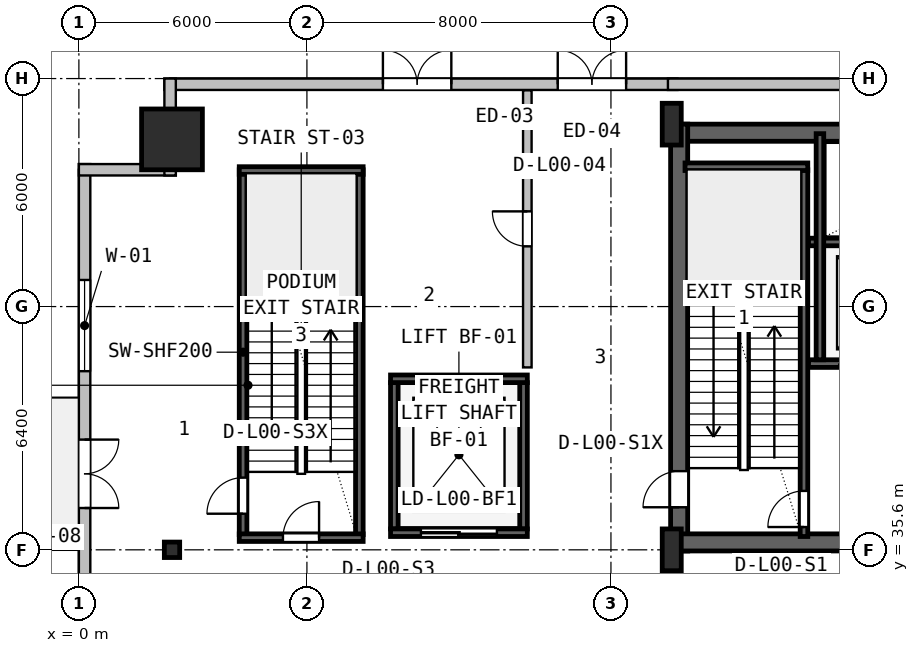
"""IFC4 building model, lengths in metres.
Left out: names, types, materials, properties, quantities, classifications, styles, units other than length and angle.
Written with IfcOpenShell. Run it as: python <this file> out.ifc"""

import sys

from ifc_helpers import new_model, si_unit, direction, frame, frame_2d, origin, origin_2d, place, context, subcontext, project, spatial, rectangle, hollow_rectangle, i_section, extrude, source, transform, mapped, element, fill, save


model = new_model("IFC4")
c1 = context("Model", 3, precision=1e-05, world=origin(), true_north=direction((0.0, 1.0)))
c2 = subcontext(c1, "Body", "Model", "MODEL_VIEW")
j1 = project(units=[si_unit("LENGTHUNIT", "METRE"), si_unit("PLANEANGLEUNIT", "RADIAN")], contexts=[c1])
p1 = place(None, origin())
s1 = spatial("IfcSite", under=j1, at=p1, CompositionType="ELEMENT")
p2 = place(p1, origin())
s2 = spatial("IfcBuilding", under=s1, at=p2, CompositionType="ELEMENT")
p3 = place(p2, origin())
s3 = spatial("IfcBuildingStorey", under=s2, at=p3, CompositionType="ELEMENT", Elevation=0.0)
p4 = place(p3, frame((15.6, 46.575, 0.0), z_axis=(0.0, 0.0, 1.0), x_axis=(1.0, 0.0, 0.0)))
e1 = element("IfcWall", 1, at=p4, inside=s3, PredefinedType="SHEAR", context=c2, shape_type="SweptSolid", body=[
    extrude(rectangle(XDim=36.8, YDim=0.45, at=frame_2d((18.4, 0.0))), origin(), (0.0, 0.0, 1.0), 5.72),
])
p5 = place(p3, frame((15.795, 35.57, 0.0), z_axis=(0.0, 0.0, 1.0), x_axis=(0.0, 1.0, 0.0)))
e2 = element("IfcWall", 2, at=p5, inside=s3, PredefinedType="SHEAR", context=c2, shape_type="SweptSolid", body=[
    extrude(rectangle(XDim=11.23, YDim=0.45, at=frame_2d((5.615, 0.0))), origin(), (0.0, 0.0, 1.0), 5.72),
])
p6 = place(p5, frame((1.15, 0.0, 0.0)))
e3 = element("IfcOpeningElement", 3, at=p6, cuts=e2, PredefinedType="OPENING", context=c2, shape_type="SweptSolid", body=[
    extrude(rectangle(XDim=0.95, YDim=2.1, at=frame_2d((0.475, 1.05))), frame((0.0, 0.235, 0.0), z_axis=(0.0, -1.0, 0.0), x_axis=(1.0, 0.0, 0.0)), (0.0, 0.0, 1.0), 0.47),
])
p7 = place(p3, frame((15.57, 35.795, 0.0), z_axis=(0.0, 0.0, 1.0), x_axis=(1.0, 0.0, 0.0)))
e4 = element("IfcWall", 4, at=p7, inside=s3, PredefinedType="SHEAR", context=c2, shape_type="SweptSolid", body=[
    extrude(rectangle(XDim=9.23, YDim=0.45, at=frame_2d((4.615, 0.0))), origin(), (0.0, 0.0, 1.0), 5.72),
])
p8 = place(p7, frame((5.4, 0.0, 0.0)))
e5 = element("IfcOpeningElement", 5, at=p8, cuts=e4, PredefinedType="OPENING", context=c2, shape_type="SweptSolid", body=[
    extrude(rectangle(XDim=1.0, YDim=2.1, at=frame_2d((0.5, 1.05))), frame((0.0, 0.235, 0.0), z_axis=(0.0, -1.0, 0.0), x_axis=(1.0, 0.0, 0.0)), (0.0, 0.0, 1.0), 0.47),
])
m1 = source(origin(), c2, "Body", "SweptSolid", [
    extrude(i_section(OverallWidth=0.5, OverallDepth=1.1, WebThickness=0.018, FlangeThickness=0.032, FilletRadius=0.018, at=origin_2d()), origin(), (0.0, 0.0, 1.0), 6.0),
])
for number, where, z_axis, x_axis in (
    (6, (15.6, 35.6, 0.0), (0.0, 0.0, 1.0), (1.0, 0.0, 0.0)),
    (7, (15.6, 46.8, 0.0), (0.0, 0.0, 1.0), (1.0, 0.0, 0.0)),
):
    element("IfcColumn", number, at=place(p3, frame(where, z_axis=z_axis, x_axis=x_axis)), inside=s3, PredefinedType="COLUMN", context=c2, shape_type="MappedRepresentation", body=[
        mapped(m1, transform((0.0, 0.0, 0.0), x_axis=(1.0, 0.0, 0.0), y_axis=(0.0, 1.0, 0.0), z_axis=(0.0, 0.0, 1.0), scale=1.0)),
    ])
m2 = source(origin(), c2, "Body", "SweptSolid", [
    extrude(hollow_rectangle(XDim=1.6, YDim=1.6, WallThickness=0.06, at=origin_2d()), origin(), (0.0, 0.0, 1.0), 6.0),
])
p9 = place(p3, frame((2.45, 46.4, 0.0), z_axis=(0.0, 0.0, 1.0), x_axis=(1.0, 0.0, 0.0)))
e8 = element("IfcColumn", 8, at=p9, inside=s3, PredefinedType="COLUMN", context=c2, shape_type="MappedRepresentation", body=[
    mapped(m2, transform((0.0, 0.0, 0.0), x_axis=(1.0, 0.0, 0.0), y_axis=(0.0, 1.0, 0.0), z_axis=(0.0, 0.0, 1.0), scale=1.0)),
])
m3 = source(origin(), c2, "Body", "SweptSolid", [
    extrude(i_section(OverallWidth=0.404, OverallDepth=0.407, WebThickness=0.027, FlangeThickness=0.044, FilletRadius=0.018, at=origin_2d()), origin(), (0.0, 0.0, 1.0), 6.0),
])
p10 = place(p3, frame((2.45, 35.6, 0.0), z_axis=(0.0, 0.0, 1.0), x_axis=(1.0, 0.0, 0.0)))
e9 = element("IfcColumn", 9, at=p10, inside=s3, PredefinedType="COLUMN", context=c2, shape_type="MappedRepresentation", body=[
    mapped(m3, transform((0.0, 0.0, 0.0), x_axis=(1.0, 0.0, 0.0), y_axis=(0.0, 1.0, 0.0), z_axis=(0.0, 0.0, 1.0), scale=1.0)),
])
p11 = place(p3, frame((2.25, 47.85, 0.0), z_axis=(0.0, 0.0, 1.0), x_axis=(1.0, 0.0, 0.0)))
e10 = element("IfcWall", 10, at=p11, inside=s3, PredefinedType="SOLIDWALL", context=c2, shape_type="SweptSolid", body=[
    extrude(rectangle(XDim=13.5, YDim=0.3, at=frame_2d((6.75, 0.0))), origin(), (0.0, 0.0, 1.0), 5.7),
])
p12 = place(p11, frame((5.75, 0.0, 0.0)))
e11 = element("IfcOpeningElement", 11, at=p12, cuts=e10, PredefinedType="OPENING", context=c2, shape_type="SweptSolid", body=[
    extrude(rectangle(XDim=1.8, YDim=2.15, at=frame_2d((0.9, 1.075))), frame((0.0, 0.16, 0.0), z_axis=(0.0, -1.0, 0.0), x_axis=(1.0, 0.0, 0.0)), (0.0, 0.0, 1.0), 0.32),
])
p13 = place(p11, frame((10.35, 0.0, 0.0)))
e12 = element("IfcOpeningElement", 12, at=p13, cuts=e10, PredefinedType="OPENING", context=c2, shape_type="SweptSolid", body=[
    extrude(rectangle(XDim=1.8, YDim=2.15, at=frame_2d((0.9, 1.075))), frame((0.0, 0.16, 0.0), z_axis=(0.0, -1.0, 0.0), x_axis=(1.0, 0.0, 0.0)), (0.0, 0.0, 1.0), 0.32),
])
p14 = place(p3, frame((15.5, 47.85, 0.0), z_axis=(0.0, 0.0, 1.0), x_axis=(1.0, 0.0, 0.0)))
e13 = element("IfcWall", 13, at=p14, inside=s3, PredefinedType="SOLIDWALL", context=c2, shape_type="SweptSolid", body=[
    extrude(rectangle(XDim=37.0, YDim=0.3, at=frame_2d((18.5, 0.0))), origin(), (0.0, 0.0, 1.0), 5.7),
])
p15 = place(p3, frame((0.15, 26.5, 0.0), z_axis=(0.0, 0.0, 1.0), x_axis=(0.0, 1.0, 0.0)))
e14 = element("IfcWall", 14, at=p15, inside=s3, PredefinedType="SOLIDWALL", context=c2, shape_type="SweptSolid", body=[
    extrude(rectangle(XDim=19.25, YDim=0.3, at=frame_2d((9.625, 0.0))), origin(), (0.0, 0.0, 1.0), 5.7),
])
p16 = place(p15, frame((10.2, 0.0, 0.0)))
e15 = element("IfcOpeningElement", 15, at=p16, cuts=e14, PredefinedType="OPENING", context=c2, shape_type="SweptSolid", body=[
    extrude(rectangle(XDim=1.8, YDim=2.15, at=frame_2d((0.9, 1.075))), frame((0.0, 0.16, 0.0), z_axis=(0.0, -1.0, 0.0), x_axis=(1.0, 0.0, 0.0)), (0.0, 0.0, 1.0), 0.32),
])
p17 = place(p15, frame((13.8, 0.0, 0.9)))
e16 = element("IfcOpeningElement", 16, at=p17, cuts=e14, PredefinedType="OPENING", context=c2, shape_type="SweptSolid", body=[
    extrude(rectangle(XDim=2.4, YDim=2.4, at=frame_2d((1.2, 1.2))), frame((0.0, 0.16, 0.0), z_axis=(0.0, -1.0, 0.0), x_axis=(1.0, 0.0, 0.0)), (0.0, 0.0, 1.0), 0.32),
])
for number, where, z_axis, x_axis in (
    (17, (0.0, 45.6, 0.0), (0.0, 0.0, 1.0), (1.0, 0.0, 0.0)),
    (18, (2.4, 45.45, 0.0), (0.0, 0.0, 1.0), (0.0, 1.0, 0.0)),
):
    element("IfcWall", number, at=place(p3, frame(where, z_axis=z_axis, x_axis=x_axis)), inside=s3, PredefinedType="SOLIDWALL", context=c2, shape_type="SweptSolid", body=[
        extrude(rectangle(XDim=2.55, YDim=0.3, at=frame_2d((1.275, 0.0))), origin(), (0.0, 0.0, 1.0), 4.783),
    ])
p18 = place(p3, frame((19.08, 35.95, 0.0), z_axis=(0.0, 0.0, 1.0), x_axis=(0.0, 1.0, 0.0)))
e19 = element("IfcWall", 19, at=p18, inside=s3, PredefinedType="SHEAR", context=c2, shape_type="SweptSolid", body=[
    extrude(rectangle(XDim=9.65, YDim=0.2, at=frame_2d((4.825, 0.0))), origin(), (0.0, 0.0, 1.0), 5.72),
])
p19 = place(p18, frame((0.25, 0.0, 0.0)))
e20 = element("IfcOpeningElement", 20, at=p19, cuts=e19, PredefinedType="OPENING", context=c2, shape_type="SweptSolid", body=[
    extrude(rectangle(XDim=0.95, YDim=2.1, at=frame_2d((0.475, 1.05))), frame((0.0, 0.11, 0.0), z_axis=(0.0, -1.0, 0.0), x_axis=(1.0, 0.0, 0.0)), (0.0, 0.0, 1.0), 0.22),
])
p20 = place(p3, frame((15.95, 45.68, 0.0), z_axis=(0.0, 0.0, 1.0), x_axis=(1.0, 0.0, 0.0)))
e21 = element("IfcWall", 21, at=p20, inside=s3, PredefinedType="SHEAR", context=c2, shape_type="SweptSolid", body=[
    extrude(rectangle(XDim=3.23, YDim=0.2, at=frame_2d((1.615, 0.0))), origin(), (0.0, 0.0, 1.0), 5.72),
])
p21 = place(p3, frame((19.2, 40.5, 0.0), z_axis=(0.0, 0.0, 1.0), x_axis=(1.0, 0.0, 0.0)))
e22 = element("IfcWall", 22, at=p21, inside=s3, PredefinedType="SHEAR", context=c2, shape_type="SweptSolid", body=[
    extrude(rectangle(XDim=5.52, YDim=0.2, at=frame_2d((2.76, 0.0))), origin(), (0.0, 0.0, 1.0), 5.72),
])
p22 = place(p21, frame((1.05, 0.0, 0.0)))
e23 = element("IfcOpeningElement", 23, at=p22, cuts=e22, PredefinedType="OPENING", context=c2, shape_type="SweptSolid", body=[
    extrude(rectangle(XDim=1.1, YDim=2.18, at=frame_2d((0.55, 1.09))), frame((0.0, 0.11, 0.0), z_axis=(0.0, -1.0, 0.0), x_axis=(1.0, 0.0, 0.0)), (0.0, 0.0, 1.0), 0.22),
])
p23 = place(p21, frame((3.65, 0.0, 0.0)))
e24 = element("IfcOpeningElement", 24, at=p23, cuts=e22, PredefinedType="OPENING", context=c2, shape_type="SweptSolid", body=[
    extrude(rectangle(XDim=1.1, YDim=2.18, at=frame_2d((0.55, 1.09))), frame((0.0, 0.11, 0.0), z_axis=(0.0, -1.0, 0.0), x_axis=(1.0, 0.0, 0.0)), (0.0, 0.0, 1.0), 0.22),
])
p24 = place(p3, frame((19.2, 43.7, 0.0), z_axis=(0.0, 0.0, 1.0), x_axis=(1.0, 0.0, 0.0)))
e25 = element("IfcWall", 25, at=p24, inside=s3, PredefinedType="SHEAR", context=c2, shape_type="SweptSolid", body=[
    extrude(rectangle(XDim=5.52, YDim=0.2, at=frame_2d((2.76, 0.0))), origin(), (0.0, 0.0, 1.0), 5.72),
])
p25 = place(p3, frame((19.5, 40.6, 0.0), z_axis=(0.0, 0.0, 1.0), x_axis=(0.0, 1.0, 0.0)))
e26 = element("IfcWall", 26, at=p25, inside=s3, PredefinedType="SHEAR", context=c2, shape_type="SweptSolid", body=[
    extrude(rectangle(XDim=5.95, YDim=0.2, at=frame_2d((2.975, 0.0))), origin(), (0.0, 0.0, 1.0), 5.72),
])
p26 = place(p3, frame((4.32, 36.0, 0.0), z_axis=(0.0, 0.0, 1.0), x_axis=(0.0, 1.0, 0.0)))
e27 = element("IfcWall", 27, at=p26, inside=s3, PredefinedType="SHEAR", context=c2, shape_type="SweptSolid", body=[
    extrude(rectangle(XDim=9.6, YDim=0.2, at=frame_2d((4.8, 0.0))), origin(), (0.0, 0.0, 1.0), 5.72),
])
p27 = place(p26, frame((0.55, 0.0, 0.0)))
e28 = element("IfcOpeningElement", 28, at=p27, cuts=e27, PredefinedType="OPENING", context=c2, shape_type="SweptSolid", body=[
    extrude(rectangle(XDim=0.95, YDim=2.1, at=frame_2d((0.475, 1.05))), frame((0.0, 0.11, 0.0), z_axis=(0.0, -1.0, 0.0), x_axis=(1.0, 0.0, 0.0)), (0.0, 0.0, 1.0), 0.22),
])
p28 = place(p3, frame((7.38, 36.0, 0.0), z_axis=(0.0, 0.0, 1.0), x_axis=(0.0, 1.0, 0.0)))
e29 = element("IfcWall", 29, at=p28, inside=s3, PredefinedType="SHEAR", context=c2, shape_type="SweptSolid", body=[
    extrude(rectangle(XDim=9.6, YDim=0.2, at=frame_2d((4.8, 0.0))), origin(), (0.0, 0.0, 1.0), 5.72),
])
p29 = place(p3, frame((4.22, 45.58, 0.0), z_axis=(0.0, 0.0, 1.0), x_axis=(1.0, 0.0, 0.0)))
e30 = element("IfcWall", 30, at=p29, inside=s3, PredefinedType="SHEAR", context=c2, shape_type="SweptSolid", body=[
    extrude(rectangle(XDim=3.26, YDim=0.2, at=frame_2d((1.63, 0.0))), origin(), (0.0, 0.0, 1.0), 5.72),
])
p30 = place(p3, frame((4.22, 35.92, 0.0), z_axis=(0.0, 0.0, 1.0), x_axis=(1.0, 0.0, 0.0)))
e31 = element("IfcWall", 31, at=p30, inside=s3, PredefinedType="SHEAR", context=c2, shape_type="SweptSolid", body=[
    extrude(rectangle(XDim=3.26, YDim=0.2, at=frame_2d((1.63, 0.0))), origin(), (0.0, 0.0, 1.0), 5.72),
])
p31 = place(p30, frame((1.15, 0.0, 0.0)))
e32 = element("IfcOpeningElement", 32, at=p31, cuts=e31, PredefinedType="OPENING", context=c2, shape_type="SweptSolid", body=[
    extrude(rectangle(XDim=0.95, YDim=2.1, at=frame_2d((0.475, 1.05))), frame((0.0, 0.11, 0.0), z_axis=(0.0, -1.0, 0.0), x_axis=(1.0, 0.0, 0.0)), (0.0, 0.0, 1.0), 0.22),
])
for number, where, z_axis, x_axis in (
    (33, (8.3, 36.15, 0.0), (0.0, 0.0, 1.0), (0.0, 1.0, 0.0)),
    (34, (11.7, 36.15, 0.0), (0.0, 0.0, 1.0), (0.0, 1.0, 0.0)),
):
    element("IfcWall", number, at=place(p3, frame(where, z_axis=z_axis, x_axis=x_axis)), inside=s3, PredefinedType="SHEAR", context=c2, shape_type="SweptSolid", body=[
        extrude(rectangle(XDim=3.85, YDim=0.2, at=frame_2d((1.925, 0.0))), origin(), (0.0, 0.0, 1.0), 5.72),
    ])
p32 = place(p3, frame((8.2, 40.1, 0.0), z_axis=(0.0, 0.0, 1.0), x_axis=(1.0, 0.0, 0.0)))
e35 = element("IfcWall", 35, at=p32, inside=s3, PredefinedType="SHEAR", context=c2, shape_type="SweptSolid", body=[
    extrude(rectangle(XDim=3.6, YDim=0.2, at=frame_2d((1.8, 0.0))), origin(), (0.0, 0.0, 1.0), 5.72),
])
p33 = place(p3, frame((8.2, 36.05, 0.0), z_axis=(0.0, 0.0, 1.0), x_axis=(1.0, 0.0, 0.0)))
e36 = element("IfcWall", 36, at=p33, inside=s3, PredefinedType="SHEAR", context=c2, shape_type="SweptSolid", body=[
    extrude(rectangle(XDim=3.6, YDim=0.2, at=frame_2d((1.8, 0.0))), origin(), (0.0, 0.0, 1.0), 5.72),
])
p34 = place(p33, frame((0.8, 0.0, 0.0)))
e37 = element("IfcOpeningElement", 37, at=p34, cuts=e36, PredefinedType="OPENING", context=c2, shape_type="SweptSolid", body=[
    extrude(rectangle(XDim=2.0, YDim=2.28, at=frame_2d((1.0, 1.14))), frame((0.0, 0.11, 0.0), z_axis=(0.0, -1.0, 0.0), x_axis=(1.0, 0.0, 0.0)), (0.0, 0.0, 1.0), 0.22),
])
p35 = place(p3, frame((11.8, 40.4, 0.0), z_axis=(0.0, 0.0, 1.0), x_axis=(0.0, 1.0, 0.0)))
e38 = element("IfcWall", 38, at=p35, inside=s3, PredefinedType="PARTITIONING", context=c2, shape_type="SweptSolid", body=[
    extrude(rectangle(XDim=7.29, YDim=0.225, at=frame_2d((3.645, 0.0))), origin(), (0.0, 0.0, 1.0), 4.783),
])
p36 = place(p35, frame((3.185, 0.0, 0.0)))
e39 = element("IfcOpeningElement", 39, at=p36, cuts=e38, PredefinedType="OPENING", context=c2, shape_type="SweptSolid", body=[
    extrude(rectangle(XDim=0.92, YDim=2.08, at=frame_2d((0.46, 1.04))), frame((0.0, 0.123, 0.0), z_axis=(0.0, -1.0, 0.0), x_axis=(1.0, 0.0, 0.0)), (0.0, 0.0, 1.0), 0.245),
])
m4 = source(origin(), c2, "Body", "SweptSolid", [
    extrude(rectangle(XDim=1.8, YDim=2.15, at=frame_2d((0.9, 1.075))), frame((0.0, 0.025, 0.0), z_axis=(0.0, -1.0, 0.0), x_axis=(1.0, 0.0, 0.0)), (0.0, 0.0, 1.0), 0.05),
])
p37 = place(p12, origin())
e40 = element("IfcDoor", 40, at=p37, inside=s3, OperationType="DOUBLE_DOOR_SINGLE_SWING", PredefinedType="DOOR", context=c2, shape_type="MappedRepresentation", body=[
    mapped(m4, transform((0.0, 0.0, 0.0), x_axis=(1.0, 0.0, 0.0), y_axis=(0.0, 1.0, 0.0), z_axis=(0.0, 0.0, 1.0), scale=1.0)),
])
fill(e11, e40)
p38 = place(p13, origin())
e41 = element("IfcDoor", 41, at=p38, inside=s3, OperationType="DOUBLE_DOOR_SINGLE_SWING", PredefinedType="DOOR", context=c2, shape_type="MappedRepresentation", body=[
    mapped(m4, transform((0.0, 0.0, 0.0), x_axis=(1.0, 0.0, 0.0), y_axis=(0.0, 1.0, 0.0), z_axis=(0.0, 0.0, 1.0), scale=1.0)),
])
fill(e12, e41)
p39 = place(p16, frame((1.8, 0.0, 0.0), z_axis=(0.0, 0.0, 1.0), x_axis=(-1.0, 0.0, 0.0)))
e42 = element("IfcDoor", 42, at=p39, inside=s3, OperationType="DOUBLE_DOOR_SINGLE_SWING", PredefinedType="DOOR", context=c2, shape_type="MappedRepresentation", body=[
    mapped(m4, transform((0.0, 0.0, 0.0), x_axis=(1.0, 0.0, 0.0), y_axis=(0.0, 1.0, 0.0), z_axis=(0.0, 0.0, 1.0), scale=1.0)),
])
fill(e15, e42)
m5 = source(origin(), c2, "Body", "SweptSolid", [
    extrude(rectangle(XDim=2.4, YDim=2.4, at=frame_2d((1.2, 1.2))), frame((0.0, 0.03, 0.0), z_axis=(0.0, -1.0, 0.0), x_axis=(1.0, 0.0, 0.0)), (0.0, 0.0, 1.0), 0.06),
])
p40 = place(p17, origin())
e43 = element("IfcWindow", 43, at=p40, inside=s3, PartitioningType="DOUBLE_PANEL_VERTICAL", PredefinedType="WINDOW", context=c2, shape_type="MappedRepresentation", body=[
    mapped(m5, transform((0.0, 0.0, 0.0), x_axis=(1.0, 0.0, 0.0), y_axis=(0.0, 1.0, 0.0), z_axis=(0.0, 0.0, 1.0), scale=1.0)),
])
fill(e16, e43)
m6 = source(origin(), c2, "Body", "SweptSolid", [
    extrude(rectangle(XDim=0.95, YDim=2.1, at=frame_2d((0.475, 1.05))), frame((0.0, 0.025, 0.0), z_axis=(0.0, -1.0, 0.0), x_axis=(1.0, 0.0, 0.0)), (0.0, 0.0, 1.0), 0.05),
])
p41 = place(p19, origin())
e44 = element("IfcDoor", 44, at=p41, inside=s3, OperationType="SINGLE_SWING_LEFT", PredefinedType="DOOR", context=c2, shape_type="MappedRepresentation", body=[
    mapped(m6, transform((0.0, 0.0, 0.0), x_axis=(1.0, 0.0, 0.0), y_axis=(0.0, 1.0, 0.0), z_axis=(0.0, 0.0, 1.0), scale=1.0)),
])
fill(e20, e44)
p42 = place(p31, origin())
e45 = element("IfcDoor", 45, at=p42, inside=s3, OperationType="SINGLE_SWING_RIGHT", PredefinedType="DOOR", context=c2, shape_type="MappedRepresentation", body=[
    mapped(m6, transform((0.0, 0.0, 0.0), x_axis=(1.0, 0.0, 0.0), y_axis=(0.0, 1.0, 0.0), z_axis=(0.0, 0.0, 1.0), scale=1.0)),
])
fill(e32, e45)
m7 = source(origin(), c2, "Body", "SweptSolid", [
    extrude(rectangle(XDim=2.0, YDim=2.28, at=frame_2d((1.0, 1.14))), frame((0.0, 0.025, 0.0), z_axis=(0.0, -1.0, 0.0), x_axis=(1.0, 0.0, 0.0)), (0.0, 0.0, 1.0), 0.05),
])
p43 = place(p34, frame((2.0, 0.0, 0.0), z_axis=(0.0, 0.0, 1.0), x_axis=(-1.0, 0.0, 0.0)))
e46 = element("IfcDoor", 46, at=p43, inside=s3, OperationType="DOUBLE_DOOR_SLIDING", PredefinedType="DOOR", context=c2, shape_type="MappedRepresentation", body=[
    mapped(m7, transform((0.0, 0.0, 0.0), x_axis=(1.0, 0.0, 0.0), y_axis=(0.0, 1.0, 0.0), z_axis=(0.0, 0.0, 1.0), scale=1.0)),
])
fill(e37, e46)
p44 = place(p6, origin())
e47 = element("IfcDoor", 47, at=p44, inside=s3, OperationType="SINGLE_SWING_LEFT", PredefinedType="DOOR", context=c2, shape_type="MappedRepresentation", body=[
    mapped(m6, transform((0.0, 0.0, 0.0), x_axis=(1.0, 0.0, 0.0), y_axis=(0.0, 1.0, 0.0), z_axis=(0.0, 0.0, 1.0), scale=1.0)),
])
fill(e3, e47)
p45 = place(p27, origin())
e48 = element("IfcDoor", 48, at=p45, inside=s3, OperationType="SINGLE_SWING_LEFT", PredefinedType="DOOR", context=c2, shape_type="MappedRepresentation", body=[
    mapped(m6, transform((0.0, 0.0, 0.0), x_axis=(1.0, 0.0, 0.0), y_axis=(0.0, 1.0, 0.0), z_axis=(0.0, 0.0, 1.0), scale=1.0)),
])
fill(e28, e48)
m8 = source(origin(), c2, "Body", "SweptSolid", [
    extrude(rectangle(XDim=0.92, YDim=2.08, at=frame_2d((0.46, 1.04))), frame((0.0, 0.025, 0.0), z_axis=(0.0, -1.0, 0.0), x_axis=(1.0, 0.0, 0.0)), (0.0, 0.0, 1.0), 0.05),
])
p46 = place(p36, origin())
e49 = element("IfcDoor", 49, at=p46, inside=s3, OperationType="SINGLE_SWING_RIGHT", PredefinedType="DOOR", context=c2, shape_type="MappedRepresentation", body=[
    mapped(m8, transform((0.0, 0.0, 0.0), x_axis=(1.0, 0.0, 0.0), y_axis=(0.0, 1.0, 0.0), z_axis=(0.0, 0.0, 1.0), scale=1.0)),
])
fill(e39, e49)
save(model, sys.argv[1])
